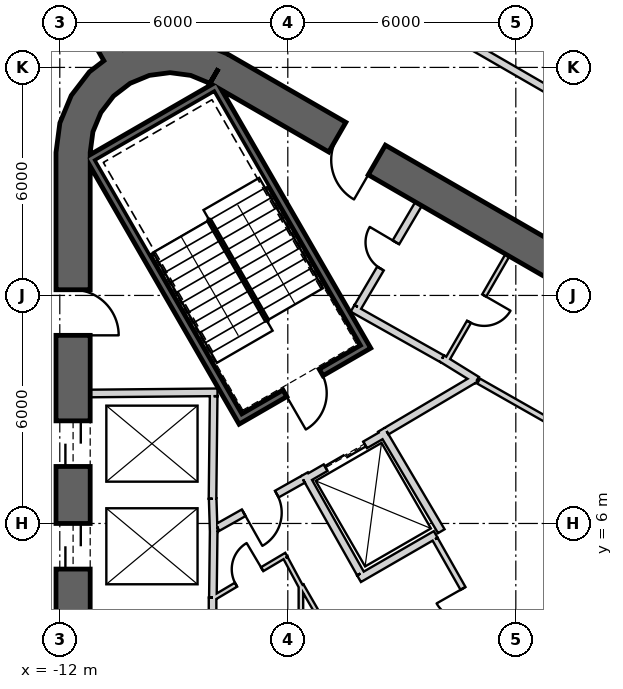
"""IFC4 building model, lengths in metres.
Left out: names, types, materials, properties, quantities, classifications, styles, units other than length and angle.
Written with IfcOpenShell. Run it as: python <this file> out.ifc"""

import sys

from ifc_helpers import new_model, si_unit, direction, frame, frame_2d, origin, place, context, subcontext, project, spatial, polyline, rectangle, outline, extrude, element, fill, save


model = new_model("IFC4")
c1 = context("Model", 3, precision=1e-05, world=origin(), true_north=direction((0.0, 1.0)))
c2 = subcontext(c1, "Body", "Model", "MODEL_VIEW")
j1 = project(units=[si_unit("LENGTHUNIT", "METRE"), si_unit("PLANEANGLEUNIT", "RADIAN")], contexts=[c1])
p1 = place(None, origin())
s1 = spatial("IfcSite", under=j1, at=p1, CompositionType="ELEMENT")
p2 = place(p1, origin())
s2 = spatial("IfcBuilding", under=s1, at=p2, CompositionType="ELEMENT")
p3 = place(p2, frame((0.0, 0.0, 298.7)))
s3 = spatial("IfcBuildingStorey", under=s2, at=p3, CompositionType="ELEMENT", Elevation=298.7)
p4 = place(p3, frame((19.475, 2.208, 0.0), z_axis=(0.0, 0.0, 1.0), x_axis=(-0.866028369851, 0.499994862586, 0.0)))
e1 = element("IfcWall", 1, at=p4, inside=s3, PredefinedType="SHEAR", context=c2, shape_type="SweptSolid", body=[
    extrude(rectangle(XDim=31.523, YDim=0.9, at=frame_2d((15.762, 0.0))), origin(), (0.0, 0.0, 1.0), 3.9),
])
p5 = place(p4, frame((7.062, 0.0, 0.0)))
e2 = element("IfcOpeningElement", 2, at=p5, cuts=e1, PredefinedType="OPENING", context=c2, shape_type="SweptSolid", body=[
    extrude(rectangle(XDim=1.2, YDim=2.4, at=frame_2d((0.6, 1.2))), frame((0.0, 0.46, 0.0), z_axis=(0.0, -1.0, 0.0), x_axis=(1.0, 0.0, 0.0)), (0.0, 0.0, 1.0), 0.92),
])
p6 = place(p4, frame((3.612, 0.0, 0.0)))
e3 = element("IfcOpeningElement", 3, at=p6, cuts=e1, PredefinedType="OPENING", context=c2, shape_type="SweptSolid", body=[
    extrude(rectangle(XDim=1.2, YDim=2.4, at=frame_2d((0.6, 1.2))), frame((0.0, 0.46, 0.0), z_axis=(0.0, -1.0, 0.0), x_axis=(1.0, 0.0, 0.0)), (0.0, 0.0, 1.0), 0.92),
])
p7 = place(p4, frame((26.712, 0.0, 0.0)))
e4 = element("IfcOpeningElement", 4, at=p7, cuts=e1, PredefinedType="OPENING", context=c2, shape_type="SweptSolid", body=[
    extrude(rectangle(XDim=1.2, YDim=2.4, at=frame_2d((0.6, 1.2))), frame((0.0, 0.46, 0.0), z_axis=(0.0, -1.0, 0.0), x_axis=(1.0, 0.0, 0.0)), (0.0, 0.0, 1.0), 0.92),
])
p8 = place(p3, frame((-11.65, 15.762, 0.0), z_axis=(0.0, 0.0, 1.0), x_axis=(0.0, -1.0, 0.0)))
e5 = element("IfcWall", 5, at=p8, inside=s3, PredefinedType="SHEAR", context=c2, shape_type="SweptSolid", body=[
    extrude(rectangle(XDim=31.523, YDim=0.9, at=frame_2d((15.762, 0.0))), origin(), (0.0, 0.0, 1.0), 3.9),
])
p9 = place(p8, frame((7.062, 0.0, 0.0)))
e6 = element("IfcOpeningElement", 6, at=p9, cuts=e5, PredefinedType="OPENING", context=c2, shape_type="SweptSolid", body=[
    extrude(rectangle(XDim=1.2, YDim=2.4, at=frame_2d((0.6, 1.2))), frame((0.0, 0.46, 0.0), z_axis=(0.0, -1.0, 0.0), x_axis=(1.0, 0.0, 0.0)), (0.0, 0.0, 1.0), 0.92),
])
p10 = place(p8, frame((9.762, 0.0, 0.0)))
e7 = element("IfcOpeningElement", 7, at=p10, cuts=e5, PredefinedType="OPENING", context=c2, shape_type="SweptSolid", body=[
    extrude(rectangle(XDim=1.2, YDim=2.4, at=frame_2d((0.6, 1.2))), frame((0.0, 0.46, 0.0), z_axis=(0.0, -1.0, 0.0), x_axis=(1.0, 0.0, 0.0)), (0.0, 0.0, 1.0), 0.92),
])
p11 = place(p8, frame((12.462, 0.0, 0.0)))
e8 = element("IfcOpeningElement", 8, at=p11, cuts=e5, PredefinedType="OPENING", context=c2, shape_type="SweptSolid", body=[
    extrude(rectangle(XDim=1.2, YDim=2.4, at=frame_2d((0.6, 1.2))), frame((0.0, 0.46, 0.0), z_axis=(0.0, -1.0, 0.0), x_axis=(1.0, 0.0, 0.0)), (0.0, 0.0, 1.0), 0.92),
])
p12 = place(p8, frame((15.162, 0.0, 0.0)))
e9 = element("IfcOpeningElement", 9, at=p12, cuts=e5, PredefinedType="OPENING", context=c2, shape_type="SweptSolid", body=[
    extrude(rectangle(XDim=1.2, YDim=2.4, at=frame_2d((0.6, 1.2))), frame((0.0, 0.46, 0.0), z_axis=(0.0, -1.0, 0.0), x_axis=(1.0, 0.0, 0.0)), (0.0, 0.0, 1.0), 0.92),
])
p13 = place(p8, frame((17.862, 0.0, 0.0)))
e10 = element("IfcOpeningElement", 10, at=p13, cuts=e5, PredefinedType="OPENING", context=c2, shape_type="SweptSolid", body=[
    extrude(rectangle(XDim=1.2, YDim=2.4, at=frame_2d((0.6, 1.2))), frame((0.0, 0.46, 0.0), z_axis=(0.0, -1.0, 0.0), x_axis=(1.0, 0.0, 0.0)), (0.0, 0.0, 1.0), 0.92),
])
p14 = place(p8, frame((20.562, 0.0, 0.0)))
e11 = element("IfcOpeningElement", 11, at=p14, cuts=e5, PredefinedType="OPENING", context=c2, shape_type="SweptSolid", body=[
    extrude(rectangle(XDim=1.2, YDim=2.4, at=frame_2d((0.6, 1.2))), frame((0.0, 0.46, 0.0), z_axis=(0.0, -1.0, 0.0), x_axis=(1.0, 0.0, 0.0)), (0.0, 0.0, 1.0), 0.92),
])
p15 = place(p8, frame((23.262, 0.0, 0.0)))
e12 = element("IfcOpeningElement", 12, at=p15, cuts=e5, PredefinedType="OPENING", context=c2, shape_type="SweptSolid", body=[
    extrude(rectangle(XDim=1.2, YDim=2.4, at=frame_2d((0.6, 1.2))), frame((0.0, 0.46, 0.0), z_axis=(0.0, -1.0, 0.0), x_axis=(1.0, 0.0, 0.0)), (0.0, 0.0, 1.0), 0.92),
])
p16 = place(p8, frame((3.612, 0.0, 0.0)))
e13 = element("IfcOpeningElement", 13, at=p16, cuts=e5, PredefinedType="OPENING", context=c2, shape_type="SweptSolid", body=[
    extrude(rectangle(XDim=1.2, YDim=2.4, at=frame_2d((0.6, 1.2))), frame((0.0, 0.46, 0.0), z_axis=(0.0, -1.0, 0.0), x_axis=(1.0, 0.0, 0.0)), (0.0, 0.0, 1.0), 0.92),
])
p17 = place(p8, frame((26.712, 0.0, 0.0)))
e14 = element("IfcOpeningElement", 14, at=p17, cuts=e5, PredefinedType="OPENING", context=c2, shape_type="SweptSolid", body=[
    extrude(rectangle(XDim=1.2, YDim=2.4, at=frame_2d((0.6, 1.2))), frame((0.0, 0.46, 0.0), z_axis=(0.0, -1.0, 0.0), x_axis=(1.0, 0.0, 0.0)), (0.0, 0.0, 1.0), 0.92),
])
p18 = place(p3, origin())
e15 = element("IfcWall", 15, at=p18, inside=s3, PredefinedType="SHEAR", context=c2, shape_type="SweptSolid", body=[
    extrude(outline(polyline([(-7.6, 18.36), (-8.323, 18.659), (-9.1, 18.762), (-9.876, 18.659), (-10.6, 18.36), (-11.221, 17.883), (-11.698, 17.262), (-11.998, 16.538), (-12.1, 15.762), (-11.2, 15.762), (-11.128, 16.305), (-10.919, 16.812), (-10.585, 17.247), (-10.15, 17.58), (-9.644, 17.79), (-9.1, 17.862), (-8.556, 17.79), (-8.05, 17.58), (-7.6, 18.36)])), origin(), (0.0, 0.0, 1.0), 3.9),
])
p19 = place(p3, frame((-10.575, 18.316, 0.0), z_axis=(0.0, 0.0, 1.0), x_axis=(-0.499999297704, 0.866025809255, 0.0)))
e16 = element("IfcWall", 16, at=p19, inside=s3, PredefinedType="SHEAR", context=c2, shape_type="SweptSolid", body=[
    extrude(rectangle(XDim=9.72, YDim=0.6, at=frame_2d((4.86, 0.0))), origin(), (0.0, 0.0, 1.0), 3.9),
])
p20 = place(p19, frame((1.4, 0.0, 0.0)))
e17 = element("IfcOpeningElement", 17, at=p20, cuts=e16, PredefinedType="OPENING", context=c2, shape_type="SweptSolid", body=[
    extrude(rectangle(XDim=1.4, YDim=2.4, at=frame_2d((0.7, 1.2))), frame((0.0, 0.31, 0.0), z_axis=(0.0, -1.0, 0.0), x_axis=(1.0, 0.0, 0.0)), (0.0, 0.0, 1.0), 0.62),
])
p21 = place(p3, frame((-11.2, 9.42, 0.0), z_axis=(0.0, 0.0, 1.0), x_axis=(0.999957167047, 0.009255488683, 0.0)))
e18 = element("IfcWall", 18, at=p21, inside=s3, PredefinedType="PLUMBINGWALL", context=c2, shape_type="SweptSolid", body=[
    extrude(rectangle(XDim=3.35, YDim=0.2, at=frame_2d((1.675, 0.0))), origin(), (0.0, 0.0, 1.0), 3.6),
])
p22 = place(p3, frame((-7.951, 9.35, 0.0), z_axis=(0.0, 0.0, 1.0), x_axis=(-0.011120469654, -0.999938165666, 0.0)))
e19 = element("IfcWall", 19, at=p22, inside=s3, PredefinedType="PLUMBINGWALL", context=c2, shape_type="SweptSolid", body=[
    extrude(rectangle(XDim=2.7, YDim=0.2, at=frame_2d((1.35, 0.0))), origin(), (0.0, 0.0, 1.0), 3.6),
])
p23 = place(p3, frame((-7.977, 6.65, 0.0), z_axis=(0.0, 0.0, 1.0), x_axis=(0.030861509705, -0.999523670164, 0.0)))
e20 = element("IfcWall", 20, at=p23, inside=s3, PredefinedType="PLUMBINGWALL", context=c2, shape_type="SweptSolid", body=[
    extrude(rectangle(XDim=0.878, YDim=0.2, at=frame_2d((0.439, 0.0))), origin(), (0.0, 0.0, 1.0), 3.6),
])
p24 = place(p3, frame((-7.949, 5.895, 0.0), z_axis=(0.0, 0.0, 1.0), x_axis=(-0.012042535896, -0.999927486035, 0.0)))
e21 = element("IfcWall", 21, at=p24, inside=s3, PredefinedType="PLUMBINGWALL", context=c2, shape_type="SweptSolid", body=[
    extrude(rectangle(XDim=1.845, YDim=0.2, at=frame_2d((0.922, 0.0))), origin(), (0.0, 0.0, 1.0), 3.6),
])
p25 = place(p3, frame((-7.98, 4.05, 0.0), z_axis=(0.0, 0.0, 1.0), x_axis=(0.0, -1.0, 0.0)))
e22 = element("IfcWall", 22, at=p25, inside=s3, PredefinedType="PLUMBINGWALL", context=c2, shape_type="SweptSolid", body=[
    extrude(rectangle(XDim=8.1, YDim=0.2, at=frame_2d((4.05, 0.0))), origin(), (0.0, 0.0, 1.0), 3.6),
])
p26 = place(p3, frame((-11.245, 15.678, -0.3), z_axis=(0.0, 0.0, 1.0), x_axis=(0.499977274689, -0.866038523851, 0.0)))
e23 = element("IfcWall", 23, at=p26, inside=s3, PredefinedType="SHEAR", context=c2, shape_type="SweptSolid", body=[
    extrude(rectangle(XDim=8.1, YDim=0.2, at=frame_2d((4.05, 0.0))), origin(), (0.0, 0.0, 1.0), 3.9),
])
p27 = place(p3, frame((-7.818, 17.541, -0.3), z_axis=(0.0, 0.0, 1.0), x_axis=(-0.866044365799, -0.499967155389, 0.0)))
e24 = element("IfcWall", 24, at=p27, inside=s3, PredefinedType="SHEAR", context=c2, shape_type="SweptSolid", body=[
    extrude(rectangle(XDim=3.8, YDim=0.2, at=frame_2d((1.9, 0.0))), origin(), (0.0, 0.0, 1.0), 3.9),
])
p28 = place(p3, frame((-7.854, 17.405, -0.3), z_axis=(0.0, 0.0, 1.0), x_axis=(0.499997992926, -0.866026562566, 0.0)))
e25 = element("IfcWall", 25, at=p28, inside=s3, PredefinedType="SHEAR", context=c2, shape_type="SweptSolid", body=[
    extrude(rectangle(XDim=7.9, YDim=0.2, at=frame_2d((3.95, 0.0))), origin(), (0.0, 0.0, 1.0), 3.9),
])
p29 = place(p3, frame((-7.159, 8.8, -0.3), z_axis=(0.0, 0.0, 1.0), x_axis=(0.866047807691, 0.499961193289, 0.0)))
e26 = element("IfcWall", 26, at=p29, inside=s3, PredefinedType="SHEAR", context=c2, shape_type="SweptSolid", body=[
    extrude(rectangle(XDim=3.6, YDim=0.2, at=frame_2d((1.8, 0.0))), origin(), (0.0, 0.0, 1.0), 3.9),
])
p30 = place(p29, frame((1.25, 0.0, 0.3)))
e27 = element("IfcOpeningElement", 27, at=p30, cuts=e26, PredefinedType="OPENING", context=c2, shape_type="SweptSolid", body=[
    extrude(rectangle(XDim=1.1, YDim=2.1, at=frame_2d((0.55, 1.05))), frame((0.0, 0.11, 0.0), z_axis=(0.0, -1.0, 0.0), x_axis=(1.0, 0.0, 0.0)), (0.0, 0.0, 1.0), 0.22),
])
p31 = place(p3, frame((-5.524, 7.168, 0.0), z_axis=(0.0, 0.0, 1.0), x_axis=(0.866024647952, 0.500001309137, 0.0)))
e28 = element("IfcWall", 28, at=p31, inside=s3, PredefinedType="PLUMBINGWALL", context=c2, shape_type="SweptSolid", body=[
    extrude(rectangle(XDim=2.4, YDim=0.2, at=frame_2d((1.2, 0.0))), origin(), (0.0, 0.0, 1.0), 3.6),
])
p32 = place(p31, frame((0.6, 0.0, 0.0)))
e29 = element("IfcOpeningElement", 29, at=p32, cuts=e28, PredefinedType="OPENING", context=c2, shape_type="SweptSolid", body=[
    extrude(rectangle(XDim=1.2, YDim=2.4, at=frame_2d((0.6, 1.2))), frame((0.0, 0.11, 0.0), z_axis=(0.0, -1.0, 0.0), x_axis=(1.0, 0.0, 0.0)), (0.0, 0.0, 1.0), 0.22),
])
p33 = place(p3, frame((-3.538, 8.465, 0.0), z_axis=(0.0, 0.0, 1.0), x_axis=(0.508647062354, -0.860975125052, 0.0)))
e30 = element("IfcWall", 30, at=p33, inside=s3, PredefinedType="PLUMBINGWALL", context=c2, shape_type="SweptSolid", body=[
    extrude(rectangle(XDim=3.1, YDim=0.2, at=frame_2d((1.55, 0.0))), origin(), (0.0, 0.0, 1.0), 3.6),
])
p34 = place(p3, frame((-2.108, 5.711, 0.0), z_axis=(0.0, 0.0, 1.0), x_axis=(-0.866009305107, -0.50002788269, 0.0)))
e31 = element("IfcWall", 31, at=p34, inside=s3, PredefinedType="PLUMBINGWALL", context=c2, shape_type="SweptSolid", body=[
    extrude(rectangle(XDim=2.329, YDim=0.2, at=frame_2d((1.165, 0.0))), origin(), (0.0, 0.0, 1.0), 3.6),
])
p35 = place(p3, frame((-5.562, 7.296, 0.0), z_axis=(0.0, 0.0, 1.0), x_axis=(0.49134651263, -0.870964180966, 0.0)))
e32 = element("IfcWall", 32, at=p35, inside=s3, PredefinedType="PLUMBINGWALL", context=c2, shape_type="SweptSolid", body=[
    extrude(rectangle(XDim=3.0, YDim=0.2, at=frame_2d((1.5, 0.0))), origin(), (0.0, 0.0, 1.0), 3.6),
])
p36 = place(p3, frame((-0.22, 13.06, 0.0), z_axis=(0.0, 0.0, 1.0), x_axis=(-0.499984717929, -0.866034226713, 0.0)))
e33 = element("IfcWall", 33, at=p36, inside=s3, PredefinedType="PARTITIONING", context=c2, shape_type="SweptSolid", body=[
    extrude(rectangle(XDim=3.25, YDim=0.12, at=frame_2d((1.625, 0.0))), origin(), (0.0, 0.0, 1.0), 3.6),
])
p37 = place(p36, frame((1.225, 0.0, 0.0)))
e34 = element("IfcOpeningElement", 34, at=p37, cuts=e33, PredefinedType="OPENING", context=c2, shape_type="SweptSolid", body=[
    extrude(rectangle(XDim=0.8, YDim=2.1, at=frame_2d((0.4, 1.05))), frame((0.0, 0.07, 0.0), z_axis=(0.0, -1.0, 0.0), x_axis=(1.0, 0.0, 0.0)), (0.0, 0.0, 1.0), 0.14),
])
p38 = place(p3, frame((-1.941, 10.339, 0.0), z_axis=(0.0, 0.0, 1.0), x_axis=(0.850216889117, -0.526432561171, 0.0)))
e35 = element("IfcWall", 35, at=p38, inside=s3, PredefinedType="PARTITIONING", context=c2, shape_type="SweptSolid", body=[
    extrude(rectangle(XDim=1.078, YDim=0.2, at=frame_2d((0.539, 0.0))), origin(), (0.0, 0.0, 1.0), 3.6),
])
p39 = place(p3, frame((2.821, 7.586, 0.0), z_axis=(0.0, 0.0, 1.0), x_axis=(-0.869333872947, 0.494225269839, 0.0)))
e36 = element("IfcWall", 36, at=p39, inside=s3, PredefinedType="PLUMBINGWALL", context=c2, shape_type="SweptSolid", body=[
    extrude(rectangle(XDim=4.372, YDim=0.15, at=frame_2d((2.186, 0.0))), origin(), (0.0, 0.0, 1.0), 3.6),
])
p40 = place(p3, frame((-4.296, 11.659, 0.0), z_axis=(0.0, 0.0, 1.0), x_axis=(0.871534483978, -0.490334215854, 0.0)))
e37 = element("IfcWall", 37, at=p40, inside=s3, PredefinedType="PARTITIONING", context=c2, shape_type="SweptSolid", body=[
    extrude(rectangle(XDim=2.7, YDim=0.2, at=frame_2d((1.35, 0.0))), origin(), (0.0, 0.0, 1.0), 3.6),
])
p41 = place(p3, frame((-2.558, 14.409, 0.0), z_axis=(0.0, 0.0, 1.0), x_axis=(-0.508018930956, -0.861345903683, 0.0)))
e38 = element("IfcWall", 38, at=p41, inside=s3, PredefinedType="PARTITIONING", context=c2, shape_type="SweptSolid", body=[
    extrude(rectangle(XDim=3.15, YDim=0.2, at=frame_2d((1.575, 0.0))), origin(), (0.0, 0.0, 1.0), 3.6),
])
p42 = place(p41, frame((1.175, 0.0, 0.0)))
e39 = element("IfcOpeningElement", 39, at=p42, cuts=e38, PredefinedType="OPENING", context=c2, shape_type="SweptSolid", body=[
    extrude(rectangle(XDim=0.8, YDim=2.1, at=frame_2d((0.4, 1.05))), frame((0.0, 0.11, 0.0), z_axis=(0.0, -1.0, 0.0), x_axis=(1.0, 0.0, 0.0)), (0.0, 0.0, 1.0), 0.22),
])
p43 = place(p3, frame((-1.055, 9.818, 0.0), z_axis=(0.0, 0.0, 1.0), x_axis=(-0.860591104342, -0.509296525737, 0.0)))
e40 = element("IfcWall", 40, at=p43, inside=s3, PredefinedType="PARTITIONING", context=c2, shape_type="SweptSolid", body=[
    extrude(rectangle(XDim=2.726, YDim=0.2, at=frame_2d((1.363, 0.0))), origin(), (0.0, 0.0, 1.0), 3.6),
])
p44 = place(p3, frame((-5.6, 7.16, 0.0), z_axis=(0.0, 0.0, 1.0), x_axis=(-0.871363259478, -0.490638431059, 0.0)))
e41 = element("IfcWall", 41, at=p44, inside=s3, PredefinedType="PARTITIONING", context=c2, shape_type="SweptSolid", body=[
    extrude(rectangle(XDim=2.581, YDim=0.2, at=frame_2d((1.291, 0.0))), origin(), (0.0, 0.0, 1.0), 3.6),
])
p45 = place(p44, frame((0.791, 0.0, 0.0)))
e42 = element("IfcOpeningElement", 42, at=p45, cuts=e41, PredefinedType="OPENING", context=c2, shape_type="SweptSolid", body=[
    extrude(rectangle(XDim=1.0, YDim=2.1, at=frame_2d((0.5, 1.05))), frame((0.0, 0.11, 0.0), z_axis=(0.0, -1.0, 0.0), x_axis=(1.0, 0.0, 0.0)), (0.0, 0.0, 1.0), 0.22),
])
p46 = place(p3, frame((-2.124, 5.586, 0.0), z_axis=(0.0, 0.0, 1.0), x_axis=(0.493408695398, -0.869797596746, 0.0)))
e43 = element("IfcWall", 43, at=p46, inside=s3, PredefinedType="PLUMBINGWALL", context=c2, shape_type="SweptSolid", body=[
    extrude(rectangle(XDim=3.778, YDim=0.15, at=frame_2d((1.889, 0.0))), origin(), (0.0, 0.0, 1.0), 3.6),
])
p47 = place(p46, frame((1.489, 0.0, 0.0)))
e44 = element("IfcOpeningElement", 44, at=p47, cuts=e43, PredefinedType="OPENING", context=c2, shape_type="SweptSolid", body=[
    extrude(rectangle(XDim=0.8, YDim=2.1, at=frame_2d((0.4, 1.05))), frame((0.0, 0.085, 0.0), z_axis=(0.0, -1.0, 0.0), x_axis=(1.0, 0.0, 0.0)), (0.0, 0.0, 1.0), 0.17),
])
p48 = place(p3, frame((-5.651, -4.388, 0.0), z_axis=(0.0, 0.0, 1.0), x_axis=(-0.000472563465, 0.999999888342, 0.0)))
e45 = element("IfcWall", 45, at=p48, inside=s3, PredefinedType="PARTITIONING", context=c2, shape_type="SweptSolid", body=[
    extrude(rectangle(XDim=8.783, YDim=0.12, at=frame_2d((4.391, 0.0))), origin(), (0.0, 0.0, 1.0), 3.6),
])
p49 = place(p3, frame((-6.037, 5.176, 0.0), z_axis=(0.0, 0.0, 1.0), x_axis=(-0.860106072674, -0.510115225953, 0.0)))
e46 = element("IfcWall", 46, at=p49, inside=s3, PredefinedType="PARTITIONING", context=c2, shape_type="SweptSolid", body=[
    extrude(rectangle(XDim=2.225, YDim=0.12, at=frame_2d((1.112, 0.0))), origin(), (0.0, 0.0, 1.0), 3.6),
])
p50 = place(p49, frame((0.742, 0.0, 0.0)))
e47 = element("IfcOpeningElement", 47, at=p50, cuts=e46, PredefinedType="OPENING", context=c2, shape_type="SweptSolid", body=[
    extrude(rectangle(XDim=0.8, YDim=2.1, at=frame_2d((0.4, 1.05))), frame((0.0, 0.07, 0.0), z_axis=(0.0, -1.0, 0.0), x_axis=(1.0, 0.0, 0.0)), (0.0, 0.0, 1.0), 0.14),
])
p51 = place(p3, frame((-5.64, 4.31, 0.0), z_axis=(0.0, 0.0, 1.0), x_axis=(-0.472770828932, 0.88118541937, 0.0)))
e48 = element("IfcWall", 48, at=p51, inside=s3, PredefinedType="PARTITIONING", context=c2, shape_type="SweptSolid", body=[
    extrude(rectangle(XDim=0.888, YDim=0.12, at=frame_2d((0.444, 0.0))), origin(), (0.0, 0.0, 1.0), 3.6),
])
p52 = place(p3, frame((-4.558, 2.495, 0.0), z_axis=(0.0, 0.0, 1.0), x_axis=(-0.499986178718, 0.866033383358, 0.0)))
e49 = element("IfcWall", 49, at=p52, inside=s3, PredefinedType="PARTITIONING", context=c2, shape_type="SweptSolid", body=[
    extrude(rectangle(XDim=2.164, YDim=0.12, at=frame_2d((1.082, 0.0))), origin(), (0.0, 0.0, 1.0), 3.6),
])
p53 = place(p3, frame((16.523, 8.358, 0.0), z_axis=(0.0, 0.0, 1.0), x_axis=(-0.866025545866, 0.499999753908, 0.0)))
e50 = element("IfcWall", 50, at=p53, inside=s3, PredefinedType="PARTITIONING", context=c2, shape_type="SweptSolid", body=[
    extrude(rectangle(XDim=26.471, YDim=0.2, at=frame_2d((13.235, 0.0))), origin(), (0.0, 0.0, 1.0), 2.88),
])
p54 = place(p53, frame((12.735, 0.0, 0.0)))
e51 = element("IfcOpeningElement", 51, at=p54, cuts=e50, PredefinedType="OPENING", context=c2, shape_type="SweptSolid", body=[
    extrude(rectangle(XDim=1.0, YDim=2.1, at=frame_2d((0.5, 1.05))), frame((0.0, 0.11, 0.0), z_axis=(0.0, -1.0, 0.0), x_axis=(1.0, 0.0, 0.0)), (0.0, 0.0, 1.0), 0.22),
])
p55 = place(p30, origin())
e52 = element("IfcDoor", 52, at=p55, inside=s3, OperationType="SINGLE_SWING_LEFT", PredefinedType="USERDEFINED", context=c2, shape_type="SweptSolid", body=[
    extrude(rectangle(XDim=1.1, YDim=2.1, at=frame_2d((0.55, 1.05))), frame((0.0, 0.025, 0.0), z_axis=(0.0, -1.0, 0.0), x_axis=(1.0, 0.0, 0.0)), (0.0, 0.0, 1.0), 0.05),
])
fill(e27, e52)
p56 = place(p45, origin())
e53 = element("IfcDoor", 53, at=p56, inside=s3, OperationType="SINGLE_SWING_RIGHT", PredefinedType="USERDEFINED", context=c2, shape_type="SweptSolid", body=[
    extrude(rectangle(XDim=1.0, YDim=2.1, at=frame_2d((0.5, 1.05))), frame((0.0, 0.025, 0.0), z_axis=(0.0, -1.0, 0.0), x_axis=(1.0, 0.0, 0.0)), (0.0, 0.0, 1.0), 0.05),
])
fill(e42, e53)
p57 = place(p32, origin())
e54 = element("IfcDoor", 54, at=p57, inside=s3, OperationType="SLIDING_TO_LEFT", PredefinedType="USERDEFINED", context=c2, shape_type="SweptSolid", body=[
    extrude(rectangle(XDim=1.2, YDim=2.4, at=frame_2d((0.6, 1.2))), frame((0.0, 0.025, 0.0), z_axis=(0.0, -1.0, 0.0), x_axis=(1.0, 0.0, 0.0)), (0.0, 0.0, 1.0), 0.05),
])
fill(e29, e54)
p58 = place(p47, origin())
e55 = element("IfcDoor", 55, at=p58, inside=s3, OperationType="SINGLE_SWING_RIGHT", PredefinedType="USERDEFINED", context=c2, shape_type="SweptSolid", body=[
    extrude(rectangle(XDim=0.8, YDim=2.1, at=frame_2d((0.4, 1.05))), frame((0.0, 0.025, 0.0), z_axis=(0.0, -1.0, 0.0), x_axis=(1.0, 0.0, 0.0)), (0.0, 0.0, 1.0), 0.05),
])
fill(e44, e55)
p59 = place(p50, origin())
e56 = element("IfcDoor", 56, at=p59, inside=s3, OperationType="SINGLE_SWING_RIGHT", PredefinedType="USERDEFINED", context=c2, shape_type="SweptSolid", body=[
    extrude(rectangle(XDim=0.8, YDim=2.1, at=frame_2d((0.4, 1.05))), frame((0.0, 0.025, 0.0), z_axis=(0.0, -1.0, 0.0), x_axis=(1.0, 0.0, 0.0)), (0.0, 0.0, 1.0), 0.05),
])
fill(e47, e56)
p60 = place(p37, origin())
e57 = element("IfcDoor", 57, at=p60, inside=s3, OperationType="SINGLE_SWING_LEFT", PredefinedType="USERDEFINED", context=c2, shape_type="SweptSolid", body=[
    extrude(rectangle(XDim=0.8, YDim=2.1, at=frame_2d((0.4, 1.05))), frame((0.0, 0.025, 0.0), z_axis=(0.0, -1.0, 0.0), x_axis=(1.0, 0.0, 0.0)), (0.0, 0.0, 1.0), 0.05),
])
fill(e34, e57)
p61 = place(p42, origin())
e58 = element("IfcDoor", 58, at=p61, inside=s3, OperationType="SINGLE_SWING_RIGHT", PredefinedType="USERDEFINED", context=c2, shape_type="SweptSolid", body=[
    extrude(rectangle(XDim=0.8, YDim=2.1, at=frame_2d((0.4, 1.05))), frame((0.0, 0.025, 0.0), z_axis=(0.0, -1.0, 0.0), x_axis=(1.0, 0.0, 0.0)), (0.0, 0.0, 1.0), 0.05),
])
fill(e39, e58)
p62 = place(p9, origin())
e59 = element("IfcDoor", 59, at=p62, inside=s3, OperationType="SLIDING_TO_LEFT", PredefinedType="USERDEFINED", context=c2, shape_type="SweptSolid", body=[
    extrude(rectangle(XDim=1.2, YDim=2.4, at=frame_2d((0.6, 1.2))), frame((0.0, 0.025, 0.0), z_axis=(0.0, -1.0, 0.0), x_axis=(1.0, 0.0, 0.0)), (0.0, 0.0, 1.0), 0.05),
])
fill(e6, e59)
p63 = place(p10, origin())
e60 = element("IfcDoor", 60, at=p63, inside=s3, OperationType="SLIDING_TO_LEFT", PredefinedType="USERDEFINED", context=c2, shape_type="SweptSolid", body=[
    extrude(rectangle(XDim=1.2, YDim=2.4, at=frame_2d((0.6, 1.2))), frame((0.0, 0.025, 0.0), z_axis=(0.0, -1.0, 0.0), x_axis=(1.0, 0.0, 0.0)), (0.0, 0.0, 1.0), 0.05),
])
fill(e7, e60)
p64 = place(p7, origin())
e61 = element("IfcDoor", 61, at=p64, inside=s3, OperationType="SINGLE_SWING_RIGHT", PredefinedType="USERDEFINED", context=c2, shape_type="SweptSolid", body=[
    extrude(rectangle(XDim=1.2, YDim=2.4, at=frame_2d((0.6, 1.2))), frame((0.0, 0.025, 0.0), z_axis=(0.0, -1.0, 0.0), x_axis=(1.0, 0.0, 0.0)), (0.0, 0.0, 1.0), 0.05),
])
fill(e4, e61)
p65 = place(p16, origin())
e62 = element("IfcDoor", 62, at=p65, inside=s3, OperationType="SINGLE_SWING_RIGHT", PredefinedType="USERDEFINED", context=c2, shape_type="SweptSolid", body=[
    extrude(rectangle(XDim=1.2, YDim=2.4, at=frame_2d((0.6, 1.2))), frame((0.0, 0.025, 0.0), z_axis=(0.0, -1.0, 0.0), x_axis=(1.0, 0.0, 0.0)), (0.0, 0.0, 1.0), 0.05),
])
fill(e13, e62)
save(model, sys.argv[1])
